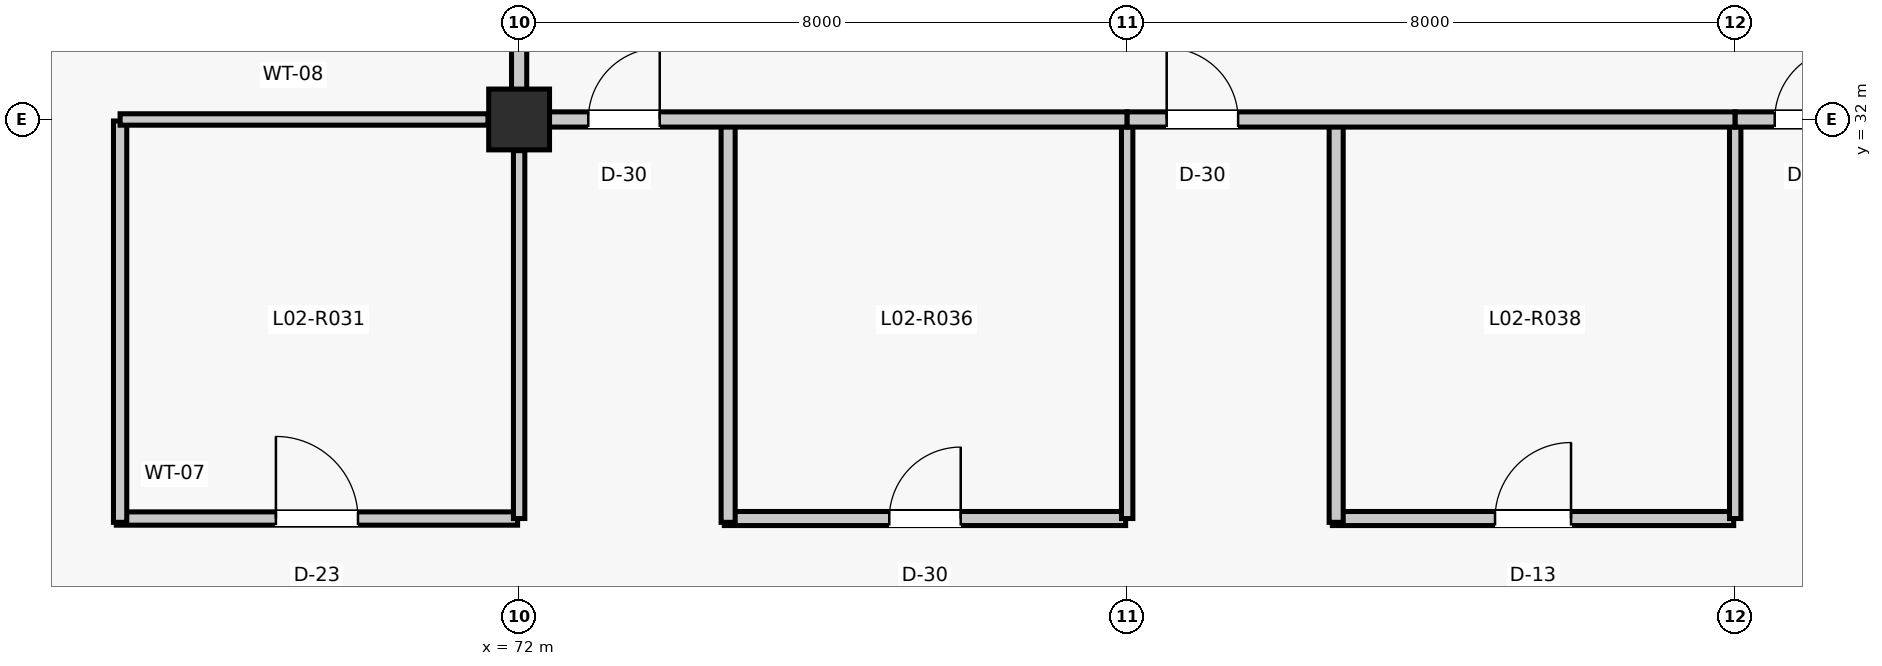
"""IFC4 building model, lengths in metres.
Left out: names, types, materials, properties, quantities, classifications, styles, units other than length and angle.
Written with IfcOpenShell. Run it as: python <this file> out.ifc"""

import sys

from ifc_helpers import new_model, si_unit, direction, frame, frame_2d, origin, origin_2d, place, context, subcontext, project, spatial, rectangle, extrude, element, fill, save


model = new_model("IFC4")
c1 = context("Model", 3, precision=1e-05, world=origin(), true_north=direction((0.0, 1.0)))
c2 = subcontext(c1, "Body", "Model", "MODEL_VIEW")
j1 = project(units=[si_unit("LENGTHUNIT", "METRE"), si_unit("PLANEANGLEUNIT", "RADIAN")], contexts=[c1])
p1 = place(None, origin())
s1 = spatial("IfcSite", under=j1, at=p1, CompositionType="ELEMENT")
p2 = place(p1, origin())
s2 = spatial("IfcBuilding", under=s1, at=p2, CompositionType="ELEMENT")
p3 = place(p2, frame((0.0, 0.0, 9.9)))
s3 = spatial("IfcBuildingStorey", under=s2, at=p3, CompositionType="ELEMENT", Elevation=9.9)
p4 = place(p3, frame((72.0, 32.0, 0.0), z_axis=(0.0, 0.0, 1.0), x_axis=(1.0, 0.0, 0.0)))
e1 = element("IfcColumn", 1, at=p4, inside=s3, PredefinedType="COLUMN", context=c2, shape_type="SweptSolid", body=[
    extrude(rectangle(XDim=0.8, YDim=0.8, at=origin_2d()), origin(), (0.0, 0.0, 1.0), 3.96),
])
p5 = place(p3, frame((66.7, 26.75, 0.0), z_axis=(0.0, 0.0, 1.0), x_axis=(1.0, 0.0, 0.0)))
e2 = element("IfcWall", 2, at=p5, inside=s3, PredefinedType="PARTITIONING", context=c2, shape_type="SweptSolid", body=[
    extrude(rectangle(XDim=5.28, YDim=0.175, at=frame_2d((2.64, 0.0))), origin(), (0.0, 0.0, 1.0), 3.157),
])
p6 = place(p5, frame((2.1, 0.0, 0.0)))
e3 = element("IfcOpeningElement", 3, at=p6, cuts=e2, PredefinedType="OPENING", context=c2, shape_type="SweptSolid", body=[
    extrude(rectangle(XDim=1.08, YDim=2.2, at=frame_2d((0.54, 1.1))), frame((0.0, 0.097, 0.0), z_axis=(0.0, -1.0, 0.0), x_axis=(1.0, 0.0, 0.0)), (0.0, 0.0, 1.0), 0.195),
])
p7 = place(p3, frame((66.75, 26.7, 0.0), z_axis=(0.0, 0.0, 1.0), x_axis=(0.0, 1.0, 0.0)))
e4 = element("IfcWall", 4, at=p7, inside=s3, PredefinedType="PARTITIONING", context=c2, shape_type="SweptSolid", body=[
    extrude(rectangle(XDim=5.28, YDim=0.175, at=frame_2d((2.64, 0.0))), origin(), (0.0, 0.0, 1.0), 3.082),
])
p8 = place(p3, frame((66.75, 32.0, 0.0), z_axis=(0.0, 0.0, 1.0), x_axis=(1.0, 0.0, 0.0)))
e5 = element("IfcWall", 5, at=p8, inside=s3, PredefinedType="PARTITIONING", context=c2, shape_type="SweptSolid", body=[
    extrude(rectangle(XDim=4.84, YDim=0.15, at=frame_2d((2.42, 0.0))), origin(), (0.0, 0.0, 1.0), 3.082),
])
p9 = place(p3, frame((72.0, 26.75, 0.0), z_axis=(0.0, 0.0, 1.0), x_axis=(0.0, 1.0, 0.0)))
e6 = element("IfcWall", 6, at=p9, inside=s3, PredefinedType="PARTITIONING", context=c2, shape_type="SweptSolid", body=[
    extrude(rectangle(XDim=4.84, YDim=0.15, at=frame_2d((2.42, 0.0))), origin(), (0.0, 0.0, 1.0), 3.157),
])
p10 = place(p3, frame((74.7, 26.75, 0.0), z_axis=(0.0, 0.0, 1.0), x_axis=(1.0, 0.0, 0.0)))
e7 = element("IfcWall", 7, at=p10, inside=s3, PredefinedType="PARTITIONING", context=c2, shape_type="SweptSolid", body=[
    extrude(rectangle(XDim=5.28, YDim=0.185, at=frame_2d((2.64, 0.0))), origin(), (0.0, 0.0, 1.0), 3.695),
])
p11 = place(p10, frame((2.17, 0.0, 0.0)))
e8 = element("IfcOpeningElement", 8, at=p11, cuts=e7, PredefinedType="OPENING", context=c2, shape_type="SweptSolid", body=[
    extrude(rectangle(XDim=0.94, YDim=2.12, at=frame_2d((0.47, 1.06))), frame((0.0, 0.103, 0.0), z_axis=(0.0, -1.0, 0.0), x_axis=(1.0, 0.0, 0.0)), (0.0, 0.0, 1.0), 0.205),
])
p12 = place(p3, frame((74.75, 26.7, 0.0), z_axis=(0.0, 0.0, 1.0), x_axis=(0.0, 1.0, 0.0)))
e9 = element("IfcWall", 9, at=p12, inside=s3, PredefinedType="PARTITIONING", context=c2, shape_type="SweptSolid", body=[
    extrude(rectangle(XDim=5.28, YDim=0.185, at=frame_2d((2.64, 0.0))), origin(), (0.0, 0.0, 1.0), 3.695),
])
p13 = place(p3, frame((80.0, 26.75, 0.0), z_axis=(0.0, 0.0, 1.0), x_axis=(0.0, 1.0, 0.0)))
e10 = element("IfcWall", 10, at=p13, inside=s3, PredefinedType="PARTITIONING", context=c2, shape_type="SweptSolid", body=[
    extrude(rectangle(XDim=5.23, YDim=0.15, at=frame_2d((2.615, 0.0))), origin(), (0.0, 0.0, 1.0), 3.695),
])
p14 = place(p3, frame((82.7, 26.75, 0.0), z_axis=(0.0, 0.0, 1.0), x_axis=(1.0, 0.0, 0.0)))
e11 = element("IfcWall", 11, at=p14, inside=s3, PredefinedType="PARTITIONING", context=c2, shape_type="SweptSolid", body=[
    extrude(rectangle(XDim=5.28, YDim=0.185, at=frame_2d((2.64, 0.0))), origin(), (0.0, 0.0, 1.0), 3.695),
])
p15 = place(p14, frame((2.14, 0.0, 0.0)))
e12 = element("IfcOpeningElement", 12, at=p15, cuts=e11, PredefinedType="OPENING", context=c2, shape_type="SweptSolid", body=[
    extrude(rectangle(XDim=1.0, YDim=2.15, at=frame_2d((0.5, 1.075))), frame((0.0, 0.103, 0.0), z_axis=(0.0, -1.0, 0.0), x_axis=(1.0, 0.0, 0.0)), (0.0, 0.0, 1.0), 0.205),
])
p16 = place(p3, frame((82.75, 26.7, 0.0), z_axis=(0.0, 0.0, 1.0), x_axis=(0.0, 1.0, 0.0)))
e13 = element("IfcWall", 13, at=p16, inside=s3, PredefinedType="PARTITIONING", context=c2, shape_type="SweptSolid", body=[
    extrude(rectangle(XDim=5.28, YDim=0.185, at=frame_2d((2.64, 0.0))), origin(), (0.0, 0.0, 1.0), 3.695),
])
p17 = place(p3, frame((88.0, 26.75, 0.0), z_axis=(0.0, 0.0, 1.0), x_axis=(0.0, 1.0, 0.0)))
e14 = element("IfcWall", 14, at=p17, inside=s3, PredefinedType="PARTITIONING", context=c2, shape_type="SweptSolid", body=[
    extrude(rectangle(XDim=5.23, YDim=0.15, at=frame_2d((2.615, 0.0))), origin(), (0.0, 0.0, 1.0), 3.695),
])
p18 = place(p3, frame((72.0, 32.39, 0.0), z_axis=(0.0, 0.0, 1.0), x_axis=(0.0, 1.0, 0.0)))
e15 = element("IfcWall", 15, at=p18, inside=s3, PredefinedType="PARTITIONING", context=c2, shape_type="SweptSolid", body=[
    extrude(rectangle(XDim=7.22, YDim=0.2, at=frame_2d((3.61, 0.0))), origin(), (0.0, 0.0, 1.0), 3.227),
])
p19 = place(p18, frame((0.52, 0.0, 0.0)))
e16 = element("IfcOpeningElement", 16, at=p19, cuts=e15, PredefinedType="OPENING", context=c2, shape_type="SweptSolid", body=[
    extrude(rectangle(XDim=0.94, YDim=2.12, at=frame_2d((0.47, 1.06))), frame((0.0, 0.11, 0.0), z_axis=(0.0, -1.0, 0.0), x_axis=(1.0, 0.0, 0.0)), (0.0, 0.0, 1.0), 0.22),
])
p20 = place(p3, frame((72.39, 32.0, 0.0), z_axis=(0.0, 0.0, 1.0), x_axis=(1.0, 0.0, 0.0)))
e17 = element("IfcWall", 17, at=p20, inside=s3, PredefinedType="PARTITIONING", context=c2, shape_type="SweptSolid", body=[
    extrude(rectangle(XDim=7.61, YDim=0.2, at=frame_2d((3.805, 0.0))), origin(), (0.0, 0.0, 1.0), 3.695),
])
p21 = place(p20, frame((0.52, 0.0, 0.0)))
e18 = element("IfcOpeningElement", 18, at=p21, cuts=e17, PredefinedType="OPENING", context=c2, shape_type="SweptSolid", body=[
    extrude(rectangle(XDim=0.94, YDim=2.12, at=frame_2d((0.47, 1.06))), frame((0.0, 0.11, 0.0), z_axis=(0.0, -1.0, 0.0), x_axis=(1.0, 0.0, 0.0)), (0.0, 0.0, 1.0), 0.22),
])
p22 = place(p3, frame((80.0, 32.0, 0.0), z_axis=(0.0, 0.0, 1.0), x_axis=(1.0, 0.0, 0.0)))
e19 = element("IfcWall", 19, at=p22, inside=s3, PredefinedType="PARTITIONING", context=c2, shape_type="SweptSolid", body=[
    extrude(rectangle(XDim=8.0, YDim=0.2, at=frame_2d((4.0, 0.0))), origin(), (0.0, 0.0, 1.0), 3.695),
])
p23 = place(p22, frame((0.52, 0.0, 0.0)))
e20 = element("IfcOpeningElement", 20, at=p23, cuts=e19, PredefinedType="OPENING", context=c2, shape_type="SweptSolid", body=[
    extrude(rectangle(XDim=0.94, YDim=2.12, at=frame_2d((0.47, 1.06))), frame((0.0, 0.11, 0.0), z_axis=(0.0, -1.0, 0.0), x_axis=(1.0, 0.0, 0.0)), (0.0, 0.0, 1.0), 0.22),
])
p24 = place(p3, frame((88.0, 32.0, 0.0), z_axis=(0.0, 0.0, 1.0), x_axis=(1.0, 0.0, 0.0)))
e21 = element("IfcWall", 21, at=p24, inside=s3, PredefinedType="PARTITIONING", context=c2, shape_type="SweptSolid", body=[
    extrude(rectangle(XDim=8.0, YDim=0.2, at=frame_2d((4.0, 0.0))), origin(), (0.0, 0.0, 1.0), 3.695),
])
p25 = place(p24, frame((0.52, 0.0, 0.0)))
e22 = element("IfcOpeningElement", 22, at=p25, cuts=e21, PredefinedType="OPENING", context=c2, shape_type="SweptSolid", body=[
    extrude(rectangle(XDim=0.94, YDim=2.12, at=frame_2d((0.47, 1.06))), frame((0.0, 0.11, 0.0), z_axis=(0.0, -1.0, 0.0), x_axis=(1.0, 0.0, 0.0)), (0.0, 0.0, 1.0), 0.22),
])
p26 = place(p6, origin())
e23 = element("IfcDoor", 23, at=p26, inside=s3, OperationType="SINGLE_SWING_LEFT", PredefinedType="DOOR", context=c2, shape_type="SweptSolid", body=[
    extrude(rectangle(XDim=1.08, YDim=2.2, at=frame_2d((0.54, 1.1))), frame((0.0, 0.025, 0.0), z_axis=(0.0, -1.0, 0.0), x_axis=(1.0, 0.0, 0.0)), (0.0, 0.0, 1.0), 0.05),
])
fill(e3, e23)
p27 = place(p11, origin())
e24 = element("IfcDoor", 24, at=p27, inside=s3, OperationType="SINGLE_SWING_RIGHT", PredefinedType="DOOR", context=c2, shape_type="SweptSolid", body=[
    extrude(rectangle(XDim=0.94, YDim=2.12, at=frame_2d((0.47, 1.06))), frame((0.0, 0.025, 0.0), z_axis=(0.0, -1.0, 0.0), x_axis=(1.0, 0.0, 0.0)), (0.0, 0.0, 1.0), 0.05),
])
fill(e8, e24)
p28 = place(p15, origin())
e25 = element("IfcDoor", 25, at=p28, inside=s3, OperationType="SINGLE_SWING_RIGHT", PredefinedType="DOOR", context=c2, shape_type="SweptSolid", body=[
    extrude(rectangle(XDim=1.0, YDim=2.15, at=frame_2d((0.5, 1.075))), frame((0.0, 0.025, 0.0), z_axis=(0.0, -1.0, 0.0), x_axis=(1.0, 0.0, 0.0)), (0.0, 0.0, 1.0), 0.05),
])
fill(e12, e25)
p29 = place(p21, origin())
e26 = element("IfcDoor", 26, at=p29, inside=s3, OperationType="SINGLE_SWING_RIGHT", PredefinedType="DOOR", context=c2, shape_type="SweptSolid", body=[
    extrude(rectangle(XDim=0.94, YDim=2.12, at=frame_2d((0.47, 1.06))), frame((0.0, 0.025, 0.0), z_axis=(0.0, -1.0, 0.0), x_axis=(1.0, 0.0, 0.0)), (0.0, 0.0, 1.0), 0.05),
])
fill(e18, e26)
p30 = place(p23, origin())
e27 = element("IfcDoor", 27, at=p30, inside=s3, OperationType="SINGLE_SWING_LEFT", PredefinedType="DOOR", context=c2, shape_type="SweptSolid", body=[
    extrude(rectangle(XDim=0.94, YDim=2.12, at=frame_2d((0.47, 1.06))), frame((0.0, 0.025, 0.0), z_axis=(0.0, -1.0, 0.0), x_axis=(1.0, 0.0, 0.0)), (0.0, 0.0, 1.0), 0.05),
])
fill(e20, e27)
p31 = place(p25, origin())
e28 = element("IfcDoor", 28, at=p31, inside=s3, OperationType="SINGLE_SWING_RIGHT", PredefinedType="DOOR", context=c2, shape_type="SweptSolid", body=[
    extrude(rectangle(XDim=0.94, YDim=2.12, at=frame_2d((0.47, 1.06))), frame((0.0, 0.025, 0.0), z_axis=(0.0, -1.0, 0.0), x_axis=(1.0, 0.0, 0.0)), (0.0, 0.0, 1.0), 0.05),
])
fill(e22, e28)
save(model, sys.argv[1])
